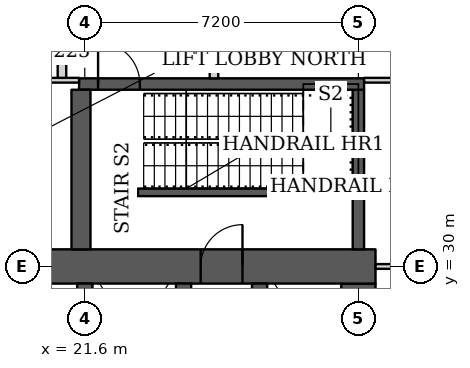
"""IFC4 building model, lengths in metres.
Left out: names, types, materials, properties, quantities, classifications, styles, units other than length and angle.
Written with IfcOpenShell. Run it as: python <this file> out.ifc"""

import sys

from ifc_helpers import new_model, si_unit, direction, frame, frame_2d, origin, place, context, subcontext, project, spatial, rectangle, extrude, element, fill, save


model = new_model("IFC4")
c1 = context("Model", 3, precision=1e-05, world=origin(), true_north=direction((0.0, 1.0)))
c2 = subcontext(c1, "Body", "Model", "MODEL_VIEW")
j1 = project(units=[si_unit("LENGTHUNIT", "METRE"), si_unit("PLANEANGLEUNIT", "RADIAN")], contexts=[c1])
p1 = place(None, origin())
s1 = spatial("IfcSite", under=j1, at=p1, CompositionType="ELEMENT")
p2 = place(p1, origin())
s2 = spatial("IfcBuilding", under=s1, at=p2, CompositionType="ELEMENT")
p3 = place(p2, origin())
s3 = spatial("IfcBuildingStorey", under=s2, at=p3, CompositionType="ELEMENT", Elevation=0.0)
p4 = place(p3, frame((13.95, 30.0, 0.0), z_axis=(0.0, 0.0, 1.0), x_axis=(1.0, 0.0, 0.0)))
e1 = element("IfcWall", 1, at=p4, inside=s3, PredefinedType="SHEAR", context=c2, shape_type="SweptSolid", body=[
    extrude(rectangle(XDim=15.3, YDim=0.9, at=frame_2d((7.65, 0.0))), origin(), (0.0, 0.0, 1.0), 5.6),
])
p5 = place(p4, frame((4.45, 0.0, 0.0)))
e2 = element("IfcOpeningElement", 2, at=p5, cuts=e1, PredefinedType="OPENING", context=c2, shape_type="SweptSolid", body=[
    extrude(rectangle(XDim=1.8, YDim=2.1, at=frame_2d((0.9, 1.05))), frame((0.0, 0.46, 0.0), z_axis=(0.0, -1.0, 0.0), x_axis=(1.0, 0.0, 0.0)), (0.0, 0.0, 1.0), 0.92),
])
p6 = place(p4, frame((10.7, 0.0, 0.0)))
e3 = element("IfcOpeningElement", 3, at=p6, cuts=e1, PredefinedType="OPENING", context=c2, shape_type="SweptSolid", body=[
    extrude(rectangle(XDim=1.1, YDim=2.1, at=frame_2d((0.55, 1.05))), frame((0.0, 0.46, 0.0), z_axis=(0.0, -1.0, 0.0), x_axis=(1.0, 0.0, 0.0)), (0.0, 0.0, 1.0), 0.92),
])
p7 = place(p3, frame((28.8, 15.45, 0.0), z_axis=(0.0, 0.0, 1.0), x_axis=(0.0, 1.0, 0.0)))
e4 = element("IfcWall", 4, at=p7, inside=s3, PredefinedType="SHEAR", context=c2, shape_type="SweptSolid", body=[
    extrude(rectangle(XDim=14.1, YDim=0.9, at=frame_2d((7.05, 0.0))), origin(), (0.0, 0.0, 1.0), 5.6),
])
p8 = place(p3, frame((21.6, 15.45, 0.0), z_axis=(0.0, 0.0, 1.0), x_axis=(0.0, 1.0, 0.0)))
e5 = element("IfcWall", 5, at=p8, inside=s3, PredefinedType="SHEAR", context=c2, shape_type="SweptSolid", body=[
    extrude(rectangle(XDim=14.1, YDim=0.4, at=frame_2d((7.05, 0.0))), origin(), (0.0, 0.0, 1.0), 5.6),
])
p9 = place(p8, frame((0.875, 0.0, 0.0)))
e6 = element("IfcOpeningElement", 6, at=p9, cuts=e5, PredefinedType="OPENING", context=c2, shape_type="SweptSolid", body=[
    extrude(rectangle(XDim=1.1, YDim=2.1, at=frame_2d((0.55, 1.05))), frame((0.0, 0.21, 0.0), z_axis=(0.0, -1.0, 0.0), x_axis=(1.0, 0.0, 0.0)), (0.0, 0.0, 1.0), 0.42),
])
p10 = place(p8, frame((4.625, 0.0, 0.0)))
e7 = element("IfcOpeningElement", 7, at=p10, cuts=e5, PredefinedType="OPENING", context=c2, shape_type="SweptSolid", body=[
    extrude(rectangle(XDim=1.1, YDim=2.1, at=frame_2d((0.55, 1.05))), frame((0.0, 0.21, 0.0), z_axis=(0.0, -1.0, 0.0), x_axis=(1.0, 0.0, 0.0)), (0.0, 0.0, 1.0), 0.42),
])
p11 = place(p8, frame((8.375, 0.0, 0.0)))
e8 = element("IfcOpeningElement", 8, at=p11, cuts=e5, PredefinedType="OPENING", context=c2, shape_type="SweptSolid", body=[
    extrude(rectangle(XDim=1.1, YDim=2.1, at=frame_2d((0.55, 1.05))), frame((0.0, 0.21, 0.0), z_axis=(0.0, -1.0, 0.0), x_axis=(1.0, 0.0, 0.0)), (0.0, 0.0, 1.0), 0.42),
])
p12 = place(p8, frame((12.125, 0.0, 0.0)))
e9 = element("IfcOpeningElement", 9, at=p12, cuts=e5, PredefinedType="OPENING", context=c2, shape_type="SweptSolid", body=[
    extrude(rectangle(XDim=1.1, YDim=2.1, at=frame_2d((0.55, 1.05))), frame((0.0, 0.21, 0.0), z_axis=(0.0, -1.0, 0.0), x_axis=(1.0, 0.0, 0.0)), (0.0, 0.0, 1.0), 0.42),
])
p13 = place(p3, frame((24.2, 15.45, 0.0), z_axis=(0.0, 0.0, 1.0), x_axis=(0.0, 1.0, 0.0)))
e10 = element("IfcWall", 10, at=p13, inside=s3, PredefinedType="SHEAR", context=c2, shape_type="SweptSolid", body=[
    extrude(rectangle(XDim=14.1, YDim=0.4, at=frame_2d((7.05, 0.0))), origin(), (0.0, 0.0, 1.0), 5.6),
])
p14 = place(p3, frame((26.2, 26.45, 0.0), z_axis=(0.0, 0.0, 1.0), x_axis=(0.0, 1.0, 0.0)))
e11 = element("IfcWall", 11, at=p14, inside=s3, PredefinedType="SHEAR", context=c2, shape_type="SweptSolid", body=[
    extrude(rectangle(XDim=3.1, YDim=0.4, at=frame_2d((1.55, 0.0))), origin(), (0.0, 0.0, 1.0), 5.6),
])
p15 = place(p14, frame((1.075, 0.0, 0.0)))
e12 = element("IfcOpeningElement", 12, at=p15, cuts=e11, PredefinedType="OPENING", context=c2, shape_type="SweptSolid", body=[
    extrude(rectangle(XDim=1.2, YDim=2.1, at=frame_2d((0.6, 1.05))), frame((0.0, 0.21, 0.0), z_axis=(0.0, -1.0, 0.0), x_axis=(1.0, 0.0, 0.0)), (0.0, 0.0, 1.0), 0.42),
])
p16 = place(p3, frame((21.45, 34.8, 0.0), z_axis=(0.0, 0.0, 1.0), x_axis=(1.0, 0.0, 0.0)))
e13 = element("IfcWall", 13, at=p16, inside=s3, PredefinedType="SHEAR", context=c2, shape_type="SweptSolid", body=[
    extrude(rectangle(XDim=7.5, YDim=0.3, at=frame_2d((3.75, 0.0))), origin(), (0.0, 0.0, 1.0), 5.6),
])
p17 = place(p16, frame((0.5, 0.0, 0.0)))
e14 = element("IfcOpeningElement", 14, at=p17, cuts=e13, PredefinedType="OPENING", context=c2, shape_type="SweptSolid", body=[
    extrude(rectangle(XDim=1.1, YDim=2.1, at=frame_2d((0.55, 1.05))), frame((0.0, 0.16, 0.0), z_axis=(0.0, -1.0, 0.0), x_axis=(1.0, 0.0, 0.0)), (0.0, 0.0, 1.0), 0.32),
])
p18 = place(p3, frame((21.5, 30.45, 0.0), z_axis=(0.0, 0.0, 1.0), x_axis=(0.0, 1.0, 0.0)))
e15 = element("IfcWall", 15, at=p18, inside=s3, PredefinedType="SHEAR", context=c2, shape_type="SweptSolid", body=[
    extrude(rectangle(XDim=4.2, YDim=0.5, at=frame_2d((2.1, 0.0))), origin(), (0.0, 0.0, 1.0), 5.6),
])
p19 = place(p3, frame((28.8, 30.45, 0.0), z_axis=(0.0, 0.0, 1.0), x_axis=(0.0, 1.0, 0.0)))
e16 = element("IfcWall", 16, at=p19, inside=s3, PredefinedType="SHEAR", context=c2, shape_type="SweptSolid", body=[
    extrude(rectangle(XDim=4.2, YDim=0.3, at=frame_2d((2.1, 0.0))), origin(), (0.0, 0.0, 1.0), 5.6),
])
p20 = place(p3, frame((25.0, 34.95, 0.0), z_axis=(0.0, 0.0, 1.0), x_axis=(0.0, 1.0, 0.0)))
e17 = element("IfcWall", 17, at=p20, inside=s3, PredefinedType="SOLIDWALL", context=c2, shape_type="SweptSolid", body=[
    extrude(rectangle(XDim=8.65, YDim=0.225, at=frame_2d((4.325, 0.0))), origin(), (0.0, 0.0, 1.0), 3.5),
])
p21 = place(p3, frame((10.163, 34.9, 0.0), z_axis=(0.0, 0.0, 1.0), x_axis=(1.0, 0.0, 0.0)))
e18 = element("IfcWall", 18, at=p21, inside=s3, PredefinedType="PARTITIONING", context=c2, shape_type="SweptSolid", body=[
    extrude(rectangle(XDim=11.287, YDim=0.125, at=frame_2d((5.644, 0.0))), origin(), (0.0, 0.0, 1.0), 3.3),
])
p22 = place(p21, frame((7.737, 0.0, 0.0)))
e19 = element("IfcOpeningElement", 19, at=p22, cuts=e18, PredefinedType="OPENING", context=c2, shape_type="SweptSolid", body=[
    extrude(rectangle(XDim=1.8, YDim=2.1, at=frame_2d((0.9, 1.05))), frame((0.0, 0.073, 0.0), z_axis=(0.0, -1.0, 0.0), x_axis=(1.0, 0.0, 0.0)), (0.0, 0.0, 1.0), 0.145),
])
p23 = place(p3, frame((28.95, 34.9, 0.0), z_axis=(0.0, 0.0, 1.0), x_axis=(1.0, 0.0, 0.0)))
e20 = element("IfcWall", 20, at=p23, inside=s3, PredefinedType="PARTITIONING", context=c2, shape_type="SweptSolid", body=[
    extrude(rectangle(XDim=4.588, YDim=0.125, at=frame_2d((2.294, 0.0))), origin(), (0.0, 0.0, 1.0), 3.3),
])
p24 = place(p3, frame((29.25, 30.0, 0.0), z_axis=(0.0, 0.0, 1.0), x_axis=(1.0, 0.0, 0.0)))
e21 = element("IfcWall", 21, at=p24, inside=s3, PredefinedType="PARTITIONING", context=c2, shape_type="SweptSolid", body=[
    extrude(rectangle(XDim=2.549, YDim=0.125, at=frame_2d((1.274, 0.0))), origin(), (0.0, 0.0, 1.0), 5.3),
])
p25 = place(p3, frame((21.0, 34.963, 0.0), z_axis=(0.0, 0.0, 1.0), x_axis=(0.0, 1.0, 0.0)))
e22 = element("IfcWall", 22, at=p25, inside=s3, PredefinedType="SOLIDWALL", context=c2, shape_type="SweptSolid", body=[
    extrude(rectangle(XDim=1.337, YDim=0.225, at=frame_2d((0.668, 0.0))), origin(), (0.0, 0.0, 1.0), 3.3),
])
p26 = place(p3, frame((23.0, 31.95, 0.0), z_axis=(0.0, 0.0, 1.0), x_axis=(1.0, 0.0, 0.0)))
e23 = element("IfcWall", 23, at=p26, inside=s3, PredefinedType="SHEAR", context=c2, shape_type="SweptSolid", body=[
    extrude(rectangle(XDim=5.8, YDim=0.2, at=frame_2d((2.9, 0.0))), origin(), (0.0, 0.0, 1.0), 5.6),
])
p27 = place(p6, origin())
e24 = element("IfcDoor", 24, at=p27, inside=s3, OperationType="SINGLE_SWING_RIGHT", PredefinedType="DOOR", context=c2, shape_type="SweptSolid", body=[
    extrude(rectangle(XDim=1.1, YDim=2.1, at=frame_2d((0.55, 1.05))), frame((0.0, 0.025, 0.0), z_axis=(0.0, -1.0, 0.0), x_axis=(1.0, 0.0, 0.0)), (0.0, 0.0, 1.0), 0.05),
])
fill(e3, e24)
p28 = place(p17, origin())
e25 = element("IfcDoor", 25, at=p28, inside=s3, OperationType="SINGLE_SWING_LEFT", PredefinedType="DOOR", context=c2, shape_type="SweptSolid", body=[
    extrude(rectangle(XDim=1.1, YDim=2.1, at=frame_2d((0.55, 1.05))), frame((0.0, 0.025, 0.0), z_axis=(0.0, -1.0, 0.0), x_axis=(1.0, 0.0, 0.0)), (0.0, 0.0, 1.0), 0.05),
])
fill(e14, e25)
save(model, sys.argv[1])
